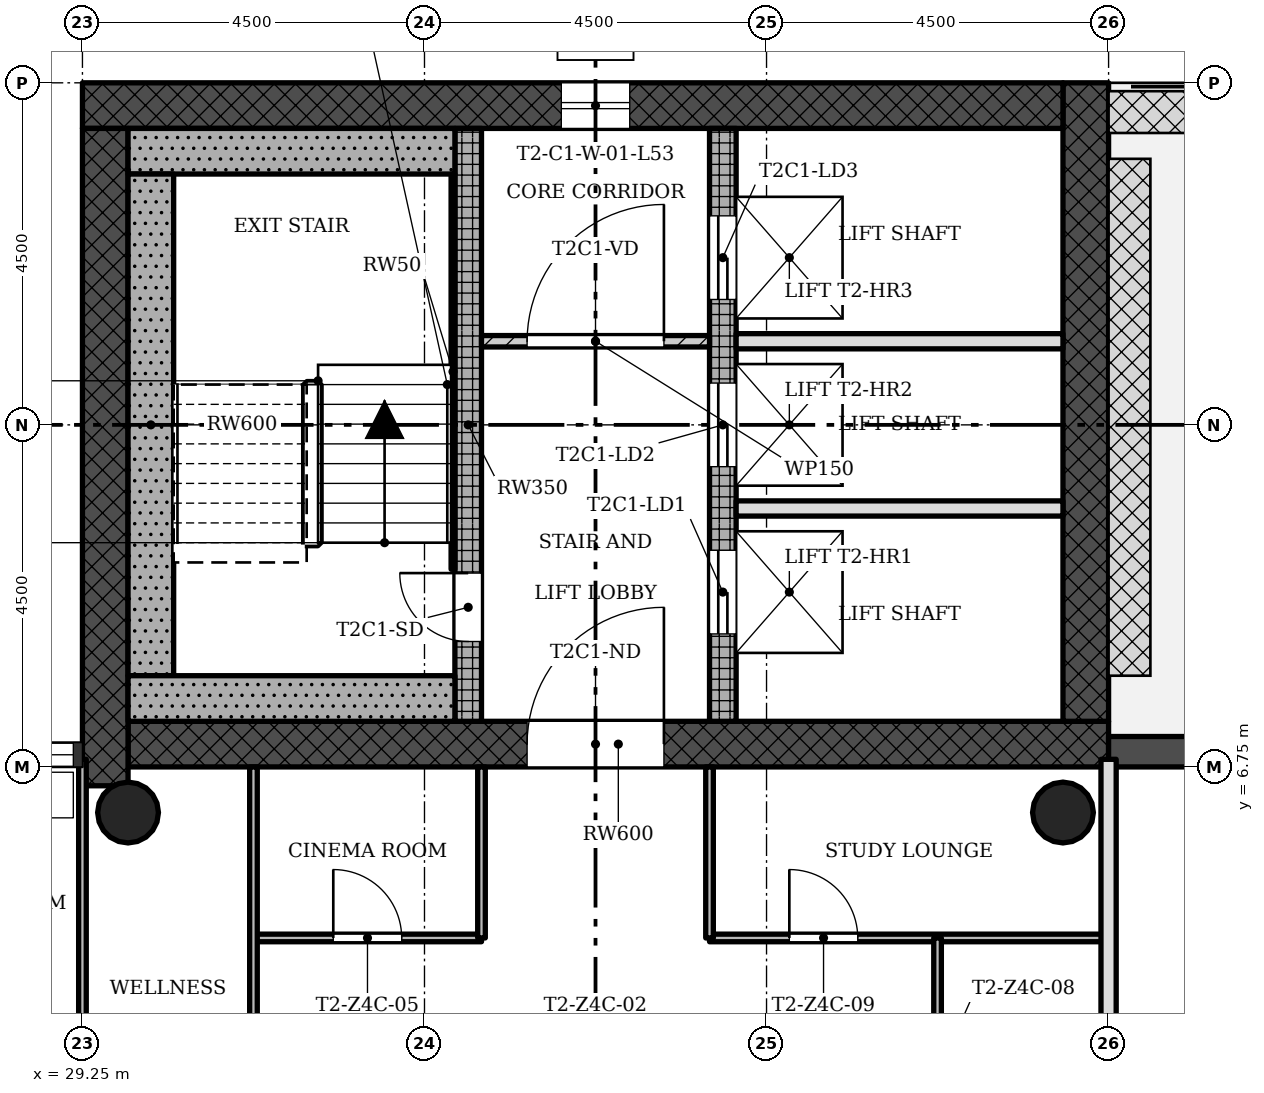
"""IFC4 building model, lengths in metres.
Left out: names, types, materials, properties, quantities, classifications, styles, units other than length and angle.
Written with IfcOpenShell. Run it as: python <this file> out.ifc"""

import sys

from ifc_helpers import new_model, si_unit, direction, frame, frame_2d, origin, origin_2d, place, context, subcontext, project, spatial, rectangle, hollow_circle, extrude, element, fill, save


model = new_model("IFC4")
c1 = context("Model", 3, precision=1e-05, world=origin(), true_north=direction((0.0, 1.0)))
c2 = subcontext(c1, "Body", "Model", "MODEL_VIEW")
j1 = project(units=[si_unit("LENGTHUNIT", "METRE"), si_unit("PLANEANGLEUNIT", "RADIAN")], contexts=[c1])
p1 = place(None, origin())
s1 = spatial("IfcSite", under=j1, at=p1, CompositionType="ELEMENT")
p2 = place(p1, origin())
s2 = spatial("IfcBuilding", under=s1, at=p2, CompositionType="ELEMENT")
p3 = place(p2, frame((0.0, 0.0, 192.6)))
s3 = spatial("IfcBuildingStorey", under=s2, at=p3, CompositionType="ELEMENT", Elevation=192.6)
p4 = place(p3, frame((29.85, 7.05, 0.0), z_axis=(0.0, 0.0, 1.0), x_axis=(1.0, 0.0, 0.0)))
e1 = element("IfcWall", 1, at=p4, inside=s3, PredefinedType="SHEAR", context=c2, shape_type="SweptSolid", body=[
    extrude(rectangle(XDim=12.9, YDim=0.6, at=frame_2d((6.45, 0.0))), origin(), (0.0, 0.0, 1.0), 3.4),
])
p5 = place(p4, frame((5.25, 0.0, 0.0)))
e2 = element("IfcOpeningElement", 2, at=p5, cuts=e1, PredefinedType="OPENING", context=c2, shape_type="SweptSolid", body=[
    extrude(rectangle(XDim=1.8, YDim=2.1, at=frame_2d((0.9, 1.05))), frame((0.0, 0.31, 0.0), z_axis=(0.0, -1.0, 0.0), x_axis=(1.0, 0.0, 0.0)), (0.0, 0.0, 1.0), 0.62),
])
p6 = place(p3, frame((42.45, 7.35, 0.0), z_axis=(0.0, 0.0, 1.0), x_axis=(0.0, 1.0, 0.0)))
e3 = element("IfcWall", 3, at=p6, inside=s3, PredefinedType="SHEAR", context=c2, shape_type="SweptSolid", body=[
    extrude(rectangle(XDim=8.4, YDim=0.6, at=frame_2d((4.2, 0.0))), origin(), (0.0, 0.0, 1.0), 3.4),
])
p7 = place(p3, frame((42.15, 15.45, 0.0), z_axis=(0.0, 0.0, 1.0), x_axis=(-1.0, 0.0, 0.0)))
e4 = element("IfcWall", 4, at=p7, inside=s3, PredefinedType="SHEAR", context=c2, shape_type="SweptSolid", body=[
    extrude(rectangle(XDim=12.9, YDim=0.6, at=frame_2d((6.45, 0.0))), origin(), (0.0, 0.0, 1.0), 3.4),
])
p8 = place(p7, frame((5.7, 0.0, 0.45)))
e5 = element("IfcOpeningElement", 5, at=p8, cuts=e4, PredefinedType="OPENING", context=c2, shape_type="SweptSolid", body=[
    extrude(rectangle(XDim=0.9, YDim=2.4, at=frame_2d((0.45, 1.2))), frame((0.0, 0.31, 0.0), z_axis=(0.0, -1.0, 0.0), x_axis=(1.0, 0.0, 0.0)), (0.0, 0.0, 1.0), 0.62),
])
p9 = place(p3, frame((29.55, 15.15, 0.0), z_axis=(0.0, 0.0, 1.0), x_axis=(0.0, -1.0, 0.0)))
e6 = element("IfcWall", 6, at=p9, inside=s3, PredefinedType="SHEAR", context=c2, shape_type="SweptSolid", body=[
    extrude(rectangle(XDim=8.648, YDim=0.6, at=frame_2d((4.324, 0.0))), origin(), (0.0, 0.0, 1.0), 3.4),
])
p10 = place(p3, frame((34.325, 7.35, 0.0), z_axis=(0.0, 0.0, 1.0), x_axis=(0.0, 1.0, 0.0)))
e7 = element("IfcWall", 7, at=p10, inside=s3, PredefinedType="SHEAR", context=c2, shape_type="SweptSolid", body=[
    extrude(rectangle(XDim=7.8, YDim=0.35, at=frame_2d((3.9, 0.0))), origin(), (0.0, 0.0, 1.0), 3.4),
])
p11 = place(p10, frame((1.05, 0.0, 0.0)))
e8 = element("IfcOpeningElement", 8, at=p11, cuts=e7, PredefinedType="OPENING", context=c2, shape_type="SweptSolid", body=[
    extrude(rectangle(XDim=0.9, YDim=2.1, at=frame_2d((0.45, 1.05))), frame((0.0, 0.185, 0.0), z_axis=(0.0, -1.0, 0.0), x_axis=(1.0, 0.0, 0.0)), (0.0, 0.0, 1.0), 0.37),
])
p12 = place(p3, frame((37.675, 7.35, 0.0), z_axis=(0.0, 0.0, 1.0), x_axis=(0.0, 1.0, 0.0)))
e9 = element("IfcWall", 9, at=p12, inside=s3, PredefinedType="SHEAR", context=c2, shape_type="SweptSolid", body=[
    extrude(rectangle(XDim=7.8, YDim=0.35, at=frame_2d((3.9, 0.0))), origin(), (0.0, 0.0, 1.0), 3.4),
])
p13 = place(p12, frame((1.15, 0.0, 0.0)))
e10 = element("IfcOpeningElement", 10, at=p13, cuts=e9, PredefinedType="OPENING", context=c2, shape_type="SweptSolid", body=[
    extrude(rectangle(XDim=1.1, YDim=2.1, at=frame_2d((0.55, 1.05))), frame((0.0, 0.185, 0.0), z_axis=(0.0, -1.0, 0.0), x_axis=(1.0, 0.0, 0.0)), (0.0, 0.0, 1.0), 0.37),
])
p14 = place(p12, frame((3.35, 0.0, 0.0)))
e11 = element("IfcOpeningElement", 11, at=p14, cuts=e9, PredefinedType="OPENING", context=c2, shape_type="SweptSolid", body=[
    extrude(rectangle(XDim=1.1, YDim=2.1, at=frame_2d((0.55, 1.05))), frame((0.0, 0.185, 0.0), z_axis=(0.0, -1.0, 0.0), x_axis=(1.0, 0.0, 0.0)), (0.0, 0.0, 1.0), 0.37),
])
p15 = place(p12, frame((5.55, 0.0, 0.0)))
e12 = element("IfcOpeningElement", 12, at=p15, cuts=e9, PredefinedType="OPENING", context=c2, shape_type="SweptSolid", body=[
    extrude(rectangle(XDim=1.1, YDim=2.1, at=frame_2d((0.55, 1.05))), frame((0.0, 0.185, 0.0), z_axis=(0.0, -1.0, 0.0), x_axis=(1.0, 0.0, 0.0)), (0.0, 0.0, 1.0), 0.37),
])
for number, where, z_axis, x_axis in (
    (13, (42.15, 6.15, 0.0), (0.0, 0.0, 1.0), (1.0, 0.0, 0.0)),
    (14, (29.85, 6.15, 0.0), (0.0, 0.0, 1.0), (1.0, 0.0, 0.0)),
):
    element("IfcColumn", number, at=place(p3, frame(where, z_axis=z_axis, x_axis=x_axis)), inside=s3, PredefinedType="COLUMN", context=c2, shape_type="SweptSolid", body=[
        extrude(hollow_circle(Radius=0.4, WallThickness=0.028, at=origin_2d()), origin(), (0.0, 0.0, 1.0), 3.4),
    ])
p16 = place(p3, frame((47.25, 6.95, -0.02), z_axis=(0.0, 0.0, 1.0), x_axis=(-1.0, 0.0, 0.0)))
e15 = element("IfcWall", 15, at=p16, inside=s3, PredefinedType="STANDARD", context=c2, shape_type="SweptSolid", body=[
    extrude(rectangle(XDim=4.5, YDim=0.4, at=frame_2d((2.25, 0.0))), origin(), (0.0, 0.0, 1.0), 3.12),
])
p17 = place(p16, frame((1.35, 0.0, 0.02)))
e16 = element("IfcOpeningElement", 16, at=p17, cuts=e15, PredefinedType="OPENING", context=c2, shape_type="SweptSolid", body=[
    extrude(rectangle(XDim=1.8, YDim=2.1, at=frame_2d((0.9, 1.05))), frame((0.0, 0.21, 0.0), z_axis=(0.0, -1.0, 0.0), x_axis=(1.0, 0.0, 0.0)), (0.0, 0.0, 1.0), 0.42),
])
p18 = place(p3, frame((37.5, 12.35, 0.0), z_axis=(0.0, 0.0, 1.0), x_axis=(-1.0, 0.0, 0.0)))
e17 = element("IfcWall", 17, at=p18, inside=s3, PredefinedType="PARTITIONING", context=c2, shape_type="SweptSolid", body=[
    extrude(rectangle(XDim=3.0, YDim=0.15, at=frame_2d((1.5, 0.0))), origin(), (0.0, 0.0, 1.0), 3.0),
])
p19 = place(p18, frame((0.6, 0.0, 0.0)))
e18 = element("IfcOpeningElement", 18, at=p19, cuts=e17, PredefinedType="OPENING", context=c2, shape_type="SweptSolid", body=[
    extrude(rectangle(XDim=1.8, YDim=2.1, at=frame_2d((0.9, 1.05))), frame((0.0, 0.085, 0.0), z_axis=(0.0, -1.0, 0.0), x_axis=(1.0, 0.0, 0.0)), (0.0, 0.0, 1.0), 0.17),
])
for number, where, z_axis, x_axis in (
    (19, (42.15, 10.15, 0.0), (0.0, 0.0, 1.0), (-1.0, 0.0, 0.0)),
    (20, (42.15, 12.35, 0.0), (0.0, 0.0, 1.0), (-1.0, 0.0, 0.0)),
):
    element("IfcWall", number, at=place(p3, frame(where, z_axis=z_axis, x_axis=x_axis)), inside=s3, PredefinedType="SOLIDWALL", context=c2, shape_type="SweptSolid", body=[
        extrude(rectangle(XDim=4.3, YDim=0.2, at=frame_2d((2.15, 0.0))), origin(), (0.0, 0.0, 1.0), 3.0),
    ])
p20 = place(p3, frame((42.75, 4.5, 0.0), z_axis=(0.0, 0.0, 1.0), x_axis=(-1.0, 0.0, 0.0)))
e21 = element("IfcWall", 21, at=p20, inside=s3, PredefinedType="PARTITIONING", context=c2, shape_type="SweptSolid", body=[
    extrude(rectangle(XDim=5.25, YDim=0.1, at=frame_2d((2.625, 0.0))), origin(), (0.0, 0.0, 1.0), 3.0),
])
p21 = place(p20, frame((3.3, 0.0, 0.0)))
e22 = element("IfcOpeningElement", 22, at=p21, cuts=e21, PredefinedType="OPENING", context=c2, shape_type="SweptSolid", body=[
    extrude(rectangle(XDim=0.9, YDim=2.1, at=frame_2d((0.45, 1.05))), frame((0.0, 0.06, 0.0), z_axis=(0.0, -1.0, 0.0), x_axis=(1.0, 0.0, 0.0)), (0.0, 0.0, 1.0), 0.12),
])
p22 = place(p3, frame((34.5, 4.5, 0.0), z_axis=(0.0, 0.0, 1.0), x_axis=(-1.0, 0.0, 0.0)))
e23 = element("IfcWall", 23, at=p22, inside=s3, PredefinedType="PARTITIONING", context=c2, shape_type="SweptSolid", body=[
    extrude(rectangle(XDim=3.0, YDim=0.1, at=frame_2d((1.5, 0.0))), origin(), (0.0, 0.0, 1.0), 3.0),
])
p23 = place(p22, frame((1.05, 0.0, 0.0)))
e24 = element("IfcOpeningElement", 24, at=p23, cuts=e23, PredefinedType="OPENING", context=c2, shape_type="SweptSolid", body=[
    extrude(rectangle(XDim=0.9, YDim=2.1, at=frame_2d((0.45, 1.05))), frame((0.0, 0.06, 0.0), z_axis=(0.0, -1.0, 0.0), x_axis=(1.0, 0.0, 0.0)), (0.0, 0.0, 1.0), 0.12),
])
p24 = place(p3, frame((42.75, -6.85, 0.0), z_axis=(0.0, 0.0, 1.0), x_axis=(0.0, 1.0, 0.0)))
e25 = element("IfcWall", 25, at=p24, inside=s3, PredefinedType="SOLIDWALL", context=c2, shape_type="SweptSolid", body=[
    extrude(rectangle(XDim=13.7, YDim=0.2, at=frame_2d((6.85, 0.0))), origin(), (0.0, 0.0, 1.0), 3.0),
])
p25 = place(p24, frame((6.4, 0.0, 0.0)))
e26 = element("IfcOpeningElement", 26, at=p25, cuts=e25, PredefinedType="OPENING", context=c2, shape_type="SweptSolid", body=[
    extrude(rectangle(XDim=0.9, YDim=2.1, at=frame_2d((0.45, 1.05))), frame((0.0, 0.11, 0.0), z_axis=(0.0, -1.0, 0.0), x_axis=(1.0, 0.0, 0.0)), (0.0, 0.0, 1.0), 0.22),
])
p26 = place(p3, frame((40.5, 0.9, 0.0), z_axis=(0.0, 0.0, 1.0), x_axis=(0.0, 1.0, 0.0)))
e27 = element("IfcWall", 27, at=p26, inside=s3, PredefinedType="PARTITIONING", context=c2, shape_type="SweptSolid", body=[
    extrude(rectangle(XDim=3.6, YDim=0.1, at=frame_2d((1.8, 0.0))), origin(), (0.0, 0.0, 1.0), 3.0),
])
p27 = place(p26, frame((1.35, 0.0, 0.0)))
e28 = element("IfcOpeningElement", 28, at=p27, cuts=e27, PredefinedType="OPENING", context=c2, shape_type="SweptSolid", body=[
    extrude(rectangle(XDim=0.9, YDim=2.1, at=frame_2d((0.45, 1.05))), frame((0.0, 0.06, 0.0), z_axis=(0.0, -1.0, 0.0), x_axis=(1.0, 0.0, 0.0)), (0.0, 0.0, 1.0), 0.12),
])
for number, where, z_axis, x_axis in (
    (29, (37.5, 4.5, 0.0), (0.0, 0.0, 1.0), (0.0, 1.0, 0.0)),
    (30, (34.5, 4.5, 0.0), (0.0, 0.0, 1.0), (0.0, 1.0, 0.0)),
):
    element("IfcWall", number, at=place(p3, frame(where, z_axis=z_axis, x_axis=x_axis)), inside=s3, PredefinedType="PARTITIONING", context=c2, shape_type="SweptSolid", body=[
        extrude(rectangle(XDim=2.25, YDim=0.1, at=frame_2d((1.125, 0.0))), origin(), (0.0, 0.0, 1.0), 3.0),
    ])
p28 = place(p3, frame((31.5, 0.9, 0.0), z_axis=(0.0, 0.0, 1.0), x_axis=(0.0, 1.0, 0.0)))
e31 = element("IfcWall", 31, at=p28, inside=s3, PredefinedType="PARTITIONING", context=c2, shape_type="SweptSolid", body=[
    extrude(rectangle(XDim=5.85, YDim=0.1, at=frame_2d((2.925, 0.0))), origin(), (0.0, 0.0, 1.0), 3.0),
])
p29 = place(p28, frame((1.35, 0.0, 0.0)))
e32 = element("IfcOpeningElement", 32, at=p29, cuts=e31, PredefinedType="OPENING", context=c2, shape_type="SweptSolid", body=[
    extrude(rectangle(XDim=0.9, YDim=2.1, at=frame_2d((0.45, 1.05))), frame((0.0, 0.06, 0.0), z_axis=(0.0, -1.0, 0.0), x_axis=(1.0, 0.0, 0.0)), (0.0, 0.0, 1.0), 0.12),
])
p30 = place(p3, frame((29.25, 0.9, 0.0), z_axis=(0.0, 0.0, 1.0), x_axis=(0.0, 1.0, 0.0)))
e33 = element("IfcWall", 33, at=p30, inside=s3, PredefinedType="PARTITIONING", context=c2, shape_type="SweptSolid", body=[
    extrude(rectangle(XDim=5.95, YDim=0.1, at=frame_2d((2.975, 0.0))), origin(), (0.0, 0.0, 1.0), 3.0),
])
p31 = place(p3, frame((34.15, 14.85, 0.0), z_axis=(0.0, 0.0, 1.0), x_axis=(-1.0, 0.0, 0.0)))
e34 = element("IfcWall", 34, at=p31, inside=s3, PredefinedType="SHEAR", context=c2, shape_type="SweptSolid", body=[
    extrude(rectangle(XDim=4.3, YDim=0.6, at=frame_2d((2.15, 0.0))), origin(), (0.0, 0.0, 1.0), 3.4),
])
p32 = place(p3, frame((30.15, 7.95, 0.0), z_axis=(0.0, 0.0, 1.0), x_axis=(0.0, 1.0, 0.0)))
e35 = element("IfcWall", 35, at=p32, inside=s3, PredefinedType="SHEAR", context=c2, shape_type="SweptSolid", body=[
    extrude(rectangle(XDim=6.6, YDim=0.6, at=frame_2d((3.3, 0.0))), origin(), (0.0, 0.0, 1.0), 3.4),
])
p33 = place(p3, frame((34.15, 7.65, 0.0), z_axis=(0.0, 0.0, 1.0), x_axis=(-1.0, 0.0, 0.0)))
e36 = element("IfcWall", 36, at=p33, inside=s3, PredefinedType="SHEAR", context=c2, shape_type="SweptSolid", body=[
    extrude(rectangle(XDim=4.3, YDim=0.6, at=frame_2d((2.15, 0.0))), origin(), (0.0, 0.0, 1.0), 3.4),
])
p34 = place(p3, frame((34.125, 9.35, 0.0), z_axis=(0.0, 0.0, 1.0), x_axis=(0.0, 1.0, 0.0)))
e37 = element("IfcWall", 37, at=p34, inside=s3, PredefinedType="SHEAR", context=c2, shape_type="SweptSolid", body=[
    extrude(rectangle(XDim=5.2, YDim=0.05, at=frame_2d((2.6, 0.0))), origin(), (0.0, 0.0, 1.0), 3.4),
])
p35 = place(p8, origin())
e38 = element("IfcWindow", 38, at=p35, inside=s3, PartitioningType="SINGLE_PANEL", PredefinedType="WINDOW", context=c2, shape_type="SweptSolid", body=[
    extrude(rectangle(XDim=0.9, YDim=2.4, at=frame_2d((0.45, 1.2))), frame((0.0, 0.03, 0.0), z_axis=(0.0, -1.0, 0.0), x_axis=(1.0, 0.0, 0.0)), (0.0, 0.0, 1.0), 0.06),
])
fill(e5, e38)
p36 = place(p19, origin())
e39 = element("IfcDoor", 39, at=p36, inside=s3, OperationType="SINGLE_SWING_LEFT", PredefinedType="DOOR", context=c2, shape_type="SweptSolid", body=[
    extrude(rectangle(XDim=1.8, YDim=2.1, at=frame_2d((0.9, 1.05))), frame((0.0, 0.025, 0.0), z_axis=(0.0, -1.0, 0.0), x_axis=(1.0, 0.0, 0.0)), (0.0, 0.0, 1.0), 0.05),
])
fill(e18, e39)
p37 = place(p23, origin())
e40 = element("IfcDoor", 40, at=p37, inside=s3, OperationType="SINGLE_SWING_RIGHT", PredefinedType="DOOR", context=c2, shape_type="SweptSolid", body=[
    extrude(rectangle(XDim=0.9, YDim=2.1, at=frame_2d((0.45, 1.05))), frame((0.0, 0.025, 0.0), z_axis=(0.0, -1.0, 0.0), x_axis=(1.0, 0.0, 0.0)), (0.0, 0.0, 1.0), 0.05),
])
fill(e24, e40)
p38 = place(p21, origin())
e41 = element("IfcDoor", 41, at=p38, inside=s3, OperationType="SINGLE_SWING_RIGHT", PredefinedType="DOOR", context=c2, shape_type="SweptSolid", body=[
    extrude(rectangle(XDim=0.9, YDim=2.1, at=frame_2d((0.45, 1.05))), frame((0.0, 0.025, 0.0), z_axis=(0.0, -1.0, 0.0), x_axis=(1.0, 0.0, 0.0)), (0.0, 0.0, 1.0), 0.05),
])
fill(e22, e41)
p39 = place(p11, origin())
e42 = element("IfcDoor", 42, at=p39, inside=s3, OperationType="SINGLE_SWING_LEFT", PredefinedType="DOOR", context=c2, shape_type="SweptSolid", body=[
    extrude(rectangle(XDim=0.9, YDim=2.1, at=frame_2d((0.45, 1.05))), frame((0.0, 0.025, 0.0), z_axis=(0.0, -1.0, 0.0), x_axis=(1.0, 0.0, 0.0)), (0.0, 0.0, 1.0), 0.05),
])
fill(e8, e42)
p40 = place(p13, origin())
e43 = element("IfcDoor", 43, at=p40, inside=s3, OperationType="SLIDING_TO_LEFT", PredefinedType="DOOR", context=c2, shape_type="SweptSolid", body=[
    extrude(rectangle(XDim=1.1, YDim=2.1, at=frame_2d((0.55, 1.05))), frame((0.0, 0.025, 0.0), z_axis=(0.0, -1.0, 0.0), x_axis=(1.0, 0.0, 0.0)), (0.0, 0.0, 1.0), 0.05),
])
fill(e10, e43)
p41 = place(p14, origin())
e44 = element("IfcDoor", 44, at=p41, inside=s3, OperationType="SLIDING_TO_LEFT", PredefinedType="DOOR", context=c2, shape_type="SweptSolid", body=[
    extrude(rectangle(XDim=1.1, YDim=2.1, at=frame_2d((0.55, 1.05))), frame((0.0, 0.025, 0.0), z_axis=(0.0, -1.0, 0.0), x_axis=(1.0, 0.0, 0.0)), (0.0, 0.0, 1.0), 0.05),
])
fill(e11, e44)
p42 = place(p15, origin())
e45 = element("IfcDoor", 45, at=p42, inside=s3, OperationType="SLIDING_TO_LEFT", PredefinedType="DOOR", context=c2, shape_type="SweptSolid", body=[
    extrude(rectangle(XDim=1.1, YDim=2.1, at=frame_2d((0.55, 1.05))), frame((0.0, 0.025, 0.0), z_axis=(0.0, -1.0, 0.0), x_axis=(1.0, 0.0, 0.0)), (0.0, 0.0, 1.0), 0.05),
])
fill(e12, e45)
p43 = place(p5, origin())
e46 = element("IfcDoor", 46, at=p43, inside=s3, OperationType="SINGLE_SWING_LEFT", PredefinedType="DOOR", context=c2, shape_type="SweptSolid", body=[
    extrude(rectangle(XDim=1.8, YDim=2.1, at=frame_2d((0.9, 1.05))), frame((0.0, 0.025, 0.0), z_axis=(0.0, -1.0, 0.0), x_axis=(1.0, 0.0, 0.0)), (0.0, 0.0, 1.0), 0.05),
])
fill(e2, e46)
save(model, sys.argv[1])
